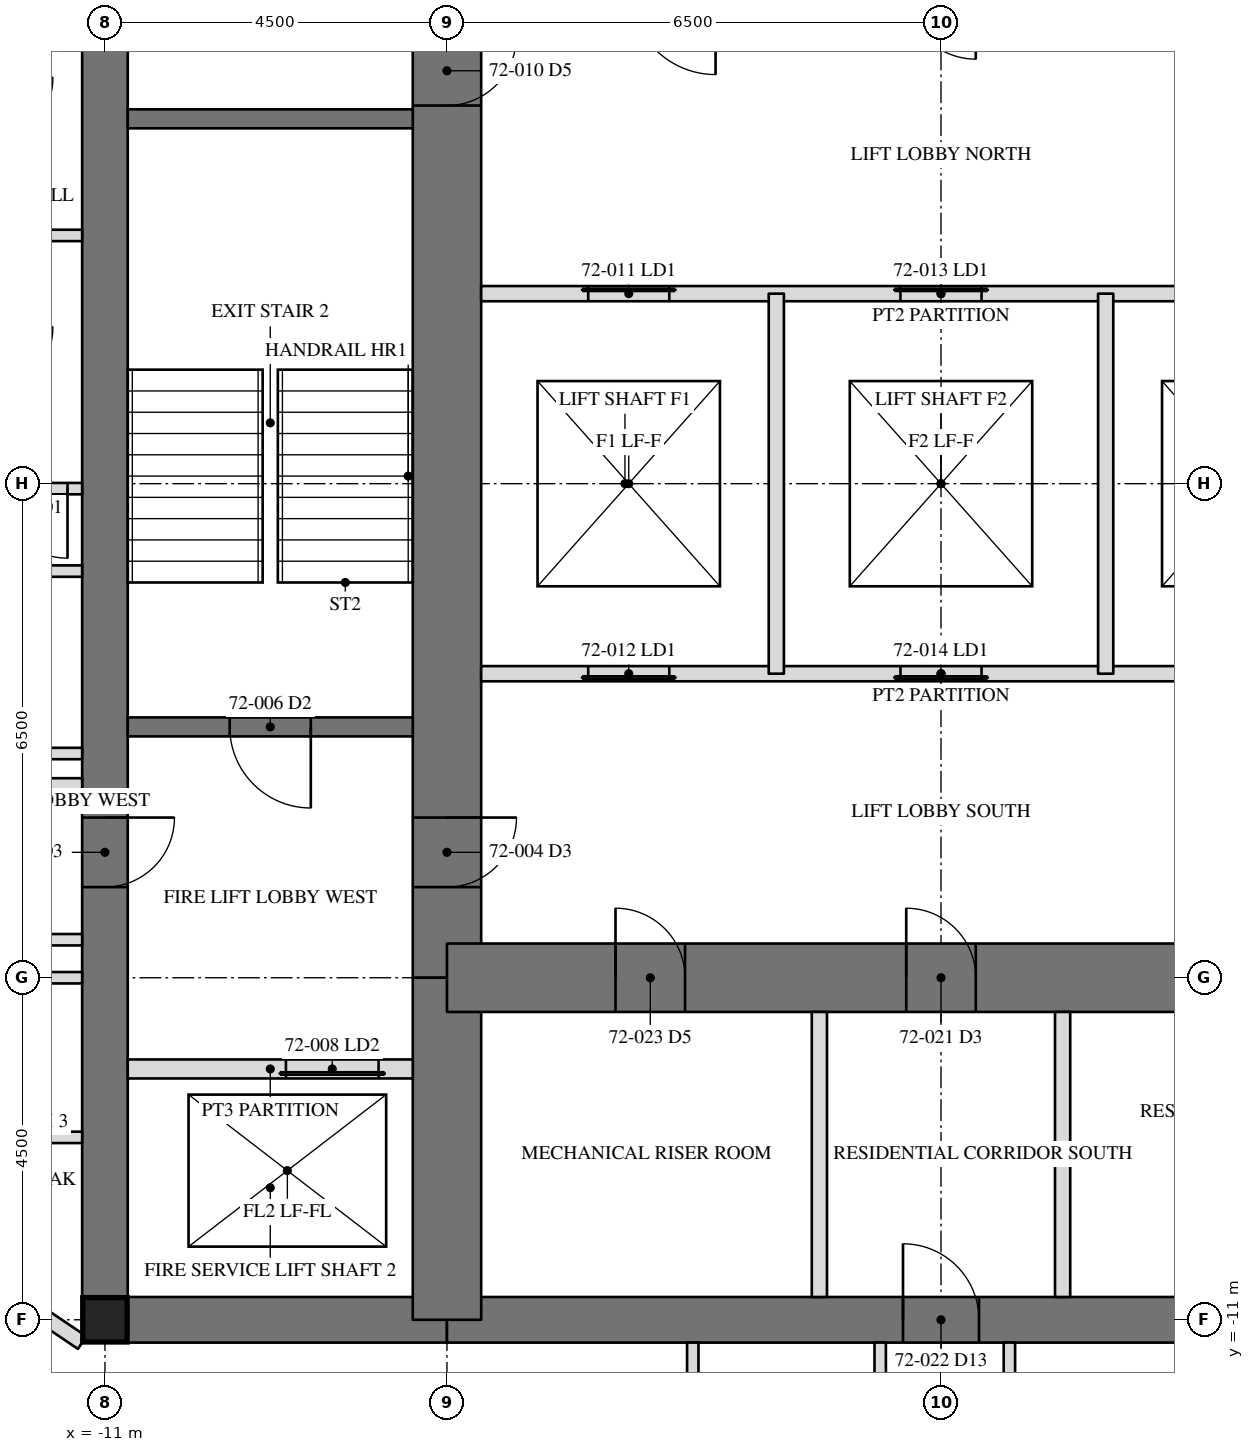
"""IFC4 building model, lengths in metres.
Left out: names, types, materials, properties, quantities, classifications, styles, units other than length and angle.
Written with IfcOpenShell. Run it as: python <this file> out.ifc"""

import sys

from ifc_helpers import new_model, si_unit, direction, frame, frame_2d, origin, origin_2d, place, context, subcontext, project, spatial, rectangle, hollow_rectangle, extrude, element, fill, save


model = new_model("IFC4")
c1 = context("Model", 3, precision=1e-05, world=origin(), true_north=direction((0.0, 1.0)))
c2 = subcontext(c1, "Body", "Model", "MODEL_VIEW")
j1 = project(units=[si_unit("LENGTHUNIT", "METRE"), si_unit("PLANEANGLEUNIT", "RADIAN")], contexts=[c1])
p1 = place(None, origin())
s1 = spatial("IfcSite", under=j1, at=p1, CompositionType="ELEMENT")
p2 = place(p1, origin())
s2 = spatial("IfcBuilding", under=s1, at=p2, CompositionType="ELEMENT")
p3 = place(p2, frame((0.0, 0.0, 292.0)))
s3 = spatial("IfcBuildingStorey", under=s2, at=p3, CompositionType="ELEMENT", Elevation=292.0)
p4 = place(p3, frame((-11.0, 11.0, 0.0), z_axis=(0.0, 0.0, 1.0), x_axis=(0.0, -1.0, 0.0)))
e1 = element("IfcWall", 1, at=p4, inside=s3, PredefinedType="SHEAR", context=c2, shape_type="SweptSolid", body=[
    extrude(rectangle(XDim=22.0, YDim=0.6, at=frame_2d((11.0, 0.0))), origin(), (0.0, 0.0, 1.0), 3.6),
])
p5 = place(p4, frame((15.393, 0.0, 0.0)))
e2 = element("IfcOpeningElement", 2, at=p5, cuts=e1, PredefinedType="OPENING", context=c2, shape_type="SweptSolid", body=[
    extrude(rectangle(XDim=0.915, YDim=2.134, at=frame_2d((0.458, 1.067))), frame((0.0, 0.31, 0.0), z_axis=(0.0, -1.0, 0.0), x_axis=(1.0, 0.0, 0.0)), (0.0, 0.0, 1.0), 0.62),
])
p6 = place(p3, frame((-11.0, -11.0, 0.0), z_axis=(0.0, 0.0, 1.0), x_axis=(1.0, 0.0, 0.0)))
e3 = element("IfcWall", 3, at=p6, inside=s3, PredefinedType="SHEAR", context=c2, shape_type="SweptSolid", body=[
    extrude(rectangle(XDim=4.5, YDim=0.6, at=frame_2d((2.25, 0.0))), origin(), (0.0, 0.0, 1.0), 3.6),
])
p7 = place(p3, frame((-6.5, -11.0, 0.0), z_axis=(0.0, 0.0, 1.0), x_axis=(1.0, 0.0, 0.0)))
e4 = element("IfcWall", 4, at=p7, inside=s3, PredefinedType="SHEAR", context=c2, shape_type="SweptSolid", body=[
    extrude(rectangle(XDim=13.0, YDim=0.6, at=frame_2d((6.5, 0.0))), origin(), (0.0, 0.0, 1.0), 3.6),
])
p8 = place(p7, frame((6.0, 0.0, 0.0)))
e5 = element("IfcOpeningElement", 5, at=p8, cuts=e4, PredefinedType="OPENING", context=c2, shape_type="SweptSolid", body=[
    extrude(rectangle(XDim=1.0, YDim=2.134, at=frame_2d((0.5, 1.067))), frame((0.0, 0.31, 0.0), z_axis=(0.0, -1.0, 0.0), x_axis=(1.0, 0.0, 0.0)), (0.0, 0.0, 1.0), 0.62),
])
p9 = place(p3, frame((-6.5, 6.5, 0.0), z_axis=(0.0, 0.0, 1.0), x_axis=(0.0, -1.0, 0.0)))
e6 = element("IfcWall", 6, at=p9, inside=s3, PredefinedType="SHEAR", context=c2, shape_type="SweptSolid", body=[
    extrude(rectangle(XDim=13.0, YDim=0.9, at=frame_2d((6.5, 0.0))), origin(), (0.0, 0.0, 1.0), 3.6),
])
p10 = place(p9, frame((10.893, 0.0, 0.0)))
e7 = element("IfcOpeningElement", 7, at=p10, cuts=e6, PredefinedType="OPENING", context=c2, shape_type="SweptSolid", body=[
    extrude(rectangle(XDim=0.915, YDim=2.134, at=frame_2d((0.458, 1.067))), frame((0.0, 0.46, 0.0), z_axis=(0.0, -1.0, 0.0), x_axis=(1.0, 0.0, 0.0)), (0.0, 0.0, 1.0), 0.92),
])
p11 = place(p9, frame((0.61, 0.0, 0.0)))
e8 = element("IfcOpeningElement", 8, at=p11, cuts=e6, PredefinedType="OPENING", context=c2, shape_type="SweptSolid", body=[
    extrude(rectangle(XDim=0.915, YDim=2.134, at=frame_2d((0.458, 1.067))), frame((0.0, 0.46, 0.0), z_axis=(0.0, -1.0, 0.0), x_axis=(1.0, 0.0, 0.0)), (0.0, 0.0, 1.0), 0.92),
])
p12 = place(p3, frame((-6.5, -6.5, 0.0), z_axis=(0.0, 0.0, 1.0), x_axis=(0.0, -1.0, 0.0)))
e9 = element("IfcWall", 9, at=p12, inside=s3, PredefinedType="SHEAR", context=c2, shape_type="SweptSolid", body=[
    extrude(rectangle(XDim=4.5, YDim=0.9, at=frame_2d((2.25, 0.0))), origin(), (0.0, 0.0, 1.0), 3.6),
])
p13 = place(p3, frame((-6.5, -6.5, 0.0), z_axis=(0.0, 0.0, 1.0), x_axis=(1.0, 0.0, 0.0)))
e10 = element("IfcWall", 10, at=p13, inside=s3, PredefinedType="SHEAR", context=c2, shape_type="SweptSolid", body=[
    extrude(rectangle(XDim=13.0, YDim=0.9, at=frame_2d((6.5, 0.0))), origin(), (0.0, 0.0, 1.0), 3.6),
])
p14 = place(p13, frame((6.042, 0.0, 0.0)))
e11 = element("IfcOpeningElement", 11, at=p14, cuts=e10, PredefinedType="OPENING", context=c2, shape_type="SweptSolid", body=[
    extrude(rectangle(XDim=0.915, YDim=2.134, at=frame_2d((0.458, 1.067))), frame((0.0, 0.46, 0.0), z_axis=(0.0, -1.0, 0.0), x_axis=(1.0, 0.0, 0.0)), (0.0, 0.0, 1.0), 0.92),
])
p15 = place(p13, frame((2.218, 0.0, 0.0)))
e12 = element("IfcOpeningElement", 12, at=p15, cuts=e10, PredefinedType="OPENING", context=c2, shape_type="SweptSolid", body=[
    extrude(rectangle(XDim=0.915, YDim=2.134, at=frame_2d((0.458, 1.067))), frame((0.0, 0.46, 0.0), z_axis=(0.0, -1.0, 0.0), x_axis=(1.0, 0.0, 0.0)), (0.0, 0.0, 1.0), 0.92),
])
p16 = place(p13, frame((9.867, 0.0, 0.0)))
e13 = element("IfcOpeningElement", 13, at=p16, cuts=e10, PredefinedType="OPENING", context=c2, shape_type="SweptSolid", body=[
    extrude(rectangle(XDim=0.915, YDim=2.134, at=frame_2d((0.458, 1.067))), frame((0.0, 0.46, 0.0), z_axis=(0.0, -1.0, 0.0), x_axis=(1.0, 0.0, 0.0)), (0.0, 0.0, 1.0), 0.92),
])
p17 = place(p3, frame((-11.0, -11.0, 0.0), z_axis=(0.0, 0.0, 1.0), x_axis=(1.0, 0.0, 0.0)))
e14 = element("IfcColumn", 14, at=p17, inside=s3, PredefinedType="COLUMN", context=c2, shape_type="SweptSolid", body=[
    extrude(hollow_rectangle(XDim=0.584, YDim=0.584, WallThickness=0.051, at=origin_2d()), origin(), (0.0, 0.0, 1.0), 3.6),
])
p18 = place(p3, frame((-6.95, 4.8, 0.0), z_axis=(0.0, 0.0, 1.0), x_axis=(-1.0, 0.0, 0.0)))
e15 = element("IfcWall", 15, at=p18, inside=s3, PredefinedType="SOLIDWALL", context=c2, shape_type="SweptSolid", body=[
    extrude(rectangle(XDim=3.75, YDim=0.25, at=frame_2d((1.875, 0.0))), origin(), (0.0, 0.0, 1.0), 3.41),
])
p19 = place(p3, frame((-6.95, -3.2, 0.0), z_axis=(0.0, 0.0, 1.0), x_axis=(-1.0, 0.0, 0.0)))
e16 = element("IfcWall", 16, at=p19, inside=s3, PredefinedType="SOLIDWALL", context=c2, shape_type="SweptSolid", body=[
    extrude(rectangle(XDim=3.75, YDim=0.25, at=frame_2d((1.875, 0.0))), origin(), (0.0, 0.0, 1.0), 3.41),
])
p20 = place(p19, frame((1.342, 0.0, 0.0)))
e17 = element("IfcOpeningElement", 17, at=p20, cuts=e16, PredefinedType="OPENING", context=c2, shape_type="SweptSolid", body=[
    extrude(rectangle(XDim=1.067, YDim=2.134, at=frame_2d((0.533, 1.067))), frame((0.0, 0.135, 0.0), z_axis=(0.0, -1.0, 0.0), x_axis=(1.0, 0.0, 0.0)), (0.0, 0.0, 1.0), 0.27),
])
p21 = place(p3, frame((-6.95, -7.7, 0.0), z_axis=(0.0, 0.0, 1.0), x_axis=(-1.0, 0.0, 0.0)))
e18 = element("IfcWall", 18, at=p21, inside=s3, PredefinedType="PARTITIONING", context=c2, shape_type="SweptSolid", body=[
    extrude(rectangle(XDim=3.75, YDim=0.25, at=frame_2d((1.875, 0.0))), origin(), (0.0, 0.0, 1.0), 3.41),
])
p22 = place(p21, frame((0.45, 0.0, 0.0)))
e19 = element("IfcOpeningElement", 19, at=p22, cuts=e18, PredefinedType="OPENING", context=c2, shape_type="SweptSolid", body=[
    extrude(rectangle(XDim=1.219, YDim=2.134, at=frame_2d((0.609, 1.067))), frame((0.0, 0.135, 0.0), z_axis=(0.0, -1.0, 0.0), x_axis=(1.0, 0.0, 0.0)), (0.0, 0.0, 1.0), 0.27),
])
p23 = place(p3, frame((-6.05, 2.5, 0.0), z_axis=(0.0, 0.0, 1.0), x_axis=(1.0, 0.0, 0.0)))
e20 = element("IfcWall", 20, at=p23, inside=s3, PredefinedType="PARTITIONING", context=c2, shape_type="SweptSolid", body=[
    extrude(rectangle(XDim=12.1, YDim=0.2, at=frame_2d((6.05, 0.0))), origin(), (0.0, 0.0, 1.0), 3.41),
])
p24 = place(p23, frame((1.408, 0.0, 0.0)))
e21 = element("IfcOpeningElement", 21, at=p24, cuts=e20, PredefinedType="OPENING", context=c2, shape_type="SweptSolid", body=[
    extrude(rectangle(XDim=1.067, YDim=2.134, at=frame_2d((0.533, 1.067))), frame((0.0, 0.11, 0.0), z_axis=(0.0, -1.0, 0.0), x_axis=(1.0, 0.0, 0.0)), (0.0, 0.0, 1.0), 0.22),
])
p25 = place(p23, frame((5.517, 0.0, 0.0)))
e22 = element("IfcOpeningElement", 22, at=p25, cuts=e20, PredefinedType="OPENING", context=c2, shape_type="SweptSolid", body=[
    extrude(rectangle(XDim=1.067, YDim=2.134, at=frame_2d((0.533, 1.067))), frame((0.0, 0.11, 0.0), z_axis=(0.0, -1.0, 0.0), x_axis=(1.0, 0.0, 0.0)), (0.0, 0.0, 1.0), 0.22),
])
p26 = place(p23, frame((9.625, 0.0, 0.0)))
e23 = element("IfcOpeningElement", 23, at=p26, cuts=e20, PredefinedType="OPENING", context=c2, shape_type="SweptSolid", body=[
    extrude(rectangle(XDim=1.067, YDim=2.134, at=frame_2d((0.533, 1.067))), frame((0.0, 0.11, 0.0), z_axis=(0.0, -1.0, 0.0), x_axis=(1.0, 0.0, 0.0)), (0.0, 0.0, 1.0), 0.22),
])
p27 = place(p3, frame((6.05, -2.5, 0.0), z_axis=(0.0, 0.0, 1.0), x_axis=(-1.0, 0.0, 0.0)))
e24 = element("IfcWall", 24, at=p27, inside=s3, PredefinedType="PARTITIONING", context=c2, shape_type="SweptSolid", body=[
    extrude(rectangle(XDim=12.1, YDim=0.2, at=frame_2d((6.05, 0.0))), origin(), (0.0, 0.0, 1.0), 3.41),
])
p28 = place(p27, frame((9.625, 0.0, 0.0)))
e25 = element("IfcOpeningElement", 25, at=p28, cuts=e24, PredefinedType="OPENING", context=c2, shape_type="SweptSolid", body=[
    extrude(rectangle(XDim=1.067, YDim=2.134, at=frame_2d((0.533, 1.067))), frame((0.0, 0.11, 0.0), z_axis=(0.0, -1.0, 0.0), x_axis=(1.0, 0.0, 0.0)), (0.0, 0.0, 1.0), 0.22),
])
p29 = place(p27, frame((5.517, 0.0, 0.0)))
e26 = element("IfcOpeningElement", 26, at=p29, cuts=e24, PredefinedType="OPENING", context=c2, shape_type="SweptSolid", body=[
    extrude(rectangle(XDim=1.067, YDim=2.134, at=frame_2d((0.533, 1.067))), frame((0.0, 0.11, 0.0), z_axis=(0.0, -1.0, 0.0), x_axis=(1.0, 0.0, 0.0)), (0.0, 0.0, 1.0), 0.22),
])
p30 = place(p27, frame((1.408, 0.0, 0.0)))
e27 = element("IfcOpeningElement", 27, at=p30, cuts=e24, PredefinedType="OPENING", context=c2, shape_type="SweptSolid", body=[
    extrude(rectangle(XDim=1.067, YDim=2.134, at=frame_2d((0.533, 1.067))), frame((0.0, 0.11, 0.0), z_axis=(0.0, -1.0, 0.0), x_axis=(1.0, 0.0, 0.0)), (0.0, 0.0, 1.0), 0.22),
])
for number, where, z_axis, x_axis in (
    (28, (-2.167, -2.5, 0.0), (0.0, 0.0, 1.0), (0.0, 1.0, 0.0)),
    (29, (2.167, -2.5, 0.0), (0.0, 0.0, 1.0), (0.0, 1.0, 0.0)),
):
    element("IfcWall", number, at=place(p3, frame(where, z_axis=z_axis, x_axis=x_axis)), inside=s3, PredefinedType="PARTITIONING", context=c2, shape_type="SweptSolid", body=[
        extrude(rectangle(XDim=5.0, YDim=0.2, at=frame_2d((2.5, 0.0))), origin(), (0.0, 0.0, 1.0), 3.41),
    ])
for number, where, z_axis, x_axis in (
    (30, (-1.6, -6.95, 0.0), (0.0, 0.0, 1.0), (0.0, -1.0, 0.0)),
    (31, (1.6, -6.95, 0.0), (0.0, 0.0, 1.0), (0.0, -1.0, 0.0)),
):
    element("IfcWall", number, at=place(p3, frame(where, z_axis=z_axis, x_axis=x_axis)), inside=s3, PredefinedType="PARTITIONING", context=c2, shape_type="SweptSolid", body=[
        extrude(rectangle(XDim=3.75, YDim=0.2, at=frame_2d((1.875, 0.0))), origin(), (0.0, 0.0, 1.0), 3.41),
    ])
p31 = place(p3, frame((-11.3, -11.3, 0.0), z_axis=(0.0, 0.0, 1.0), x_axis=(-0.829279340477, 0.558834300538, 0.0)))
e32 = element("IfcWall", 32, at=p31, inside=s3, PredefinedType="PARTITIONING", context=c2, shape_type="SweptSolid", body=[
    extrude(rectangle(XDim=3.048, YDim=0.2, at=frame_2d((1.524, 0.0))), origin(), (0.0, 0.0, 1.0), 2.704),
])
p32 = place(p3, frame((-11.3, 3.266, 0.0), z_axis=(0.0, 0.0, 1.0), x_axis=(-1.0, 0.0, 0.0)))
e33 = element("IfcWall", 33, at=p32, inside=s3, PredefinedType="PARTITIONING", context=c2, shape_type="SweptSolid", body=[
    extrude(rectangle(XDim=5.615, YDim=0.15, at=frame_2d((2.808, 0.0))), origin(), (0.0, 0.0, 1.0), 2.709),
])
p33 = place(p3, frame((-11.3, -0.065, 0.0), z_axis=(0.0, 0.0, 1.0), x_axis=(-1.0, 0.0, 0.0)))
e34 = element("IfcWall", 34, at=p33, inside=s3, PredefinedType="PARTITIONING", context=c2, shape_type="SweptSolid", body=[
    extrude(rectangle(XDim=5.615, YDim=0.15, at=frame_2d((2.808, 0.0))), origin(), (0.0, 0.0, 1.0), 2.709),
])
p34 = place(p33, frame((0.192, 0.0, 0.0)))
e35 = element("IfcOpeningElement", 35, at=p34, cuts=e34, PredefinedType="OPENING", context=c2, shape_type="SweptSolid", body=[
    extrude(rectangle(XDim=0.915, YDim=2.134, at=frame_2d((0.458, 1.067))), frame((0.0, 0.085, 0.0), z_axis=(0.0, -1.0, 0.0), x_axis=(1.0, 0.0, 0.0)), (0.0, 0.0, 1.0), 0.17),
])
p35 = place(p3, frame((-11.3, -6.5, 0.0), z_axis=(0.0, 0.0, 1.0), x_axis=(-1.0, 0.0, 0.0)))
e36 = element("IfcWall", 36, at=p35, inside=s3, PredefinedType="PARTITIONING", context=c2, shape_type="SweptSolid", body=[
    extrude(rectangle(XDim=5.615, YDim=0.15, at=frame_2d((2.808, 0.0))), origin(), (0.0, 0.0, 1.0), 2.966),
])
p36 = place(p35, frame((2.742, 0.0, 0.0)))
e37 = element("IfcOpeningElement", 37, at=p36, cuts=e36, PredefinedType="OPENING", context=c2, shape_type="SweptSolid", body=[
    extrude(rectangle(XDim=0.915, YDim=2.134, at=frame_2d((0.458, 1.067))), frame((0.0, 0.085, 0.0), z_axis=(0.0, -1.0, 0.0), x_axis=(1.0, 0.0, 0.0)), (0.0, 0.0, 1.0), 0.17),
])
for number, where, z_axis, x_axis in (
    (38, (-11.3, -3.95, 0.0), (0.0, 0.0, 1.0), (-1.0, 0.0, 0.0)),
    (39, (-11.3, -6.0, 0.0), (0.0, 0.0, 1.0), (-1.0, 0.0, 0.0)),
):
    element("IfcWall", number, at=place(p3, frame(where, z_axis=z_axis, x_axis=x_axis)), inside=s3, PredefinedType="PARTITIONING", context=c2, shape_type="SweptSolid", body=[
        extrude(rectangle(XDim=1.525, YDim=0.15, at=frame_2d((0.762, 0.0))), origin(), (0.0, 0.0, 1.0), 3.41),
    ])
for number, where, z_axis, x_axis in (
    (40, (-11.3, -1.15, 0.0), (0.0, 0.0, 1.0), (-1.0, 0.0, 0.0)),
    (41, (-11.3, -3.55, 0.0), (0.0, 0.0, 1.0), (-1.0, 0.0, 0.0)),
):
    element("IfcWall", number, at=place(p3, frame(where, z_axis=z_axis, x_axis=x_axis)), inside=s3, PredefinedType="PARTITIONING", context=c2, shape_type="SweptSolid", body=[
        extrude(rectangle(XDim=2.725, YDim=0.15, at=frame_2d((1.362, 0.0))), origin(), (0.0, 0.0, 1.0), 3.41),
    ])
p37 = place(p3, frame((-11.3, -8.6, 0.0), z_axis=(0.0, 0.0, 1.0), x_axis=(-1.0, 0.0, 0.0)))
e42 = element("IfcWall", 42, at=p37, inside=s3, PredefinedType="PARTITIONING", context=c2, shape_type="SweptSolid", body=[
    extrude(rectangle(XDim=1.925, YDim=0.15, at=frame_2d((0.962, 0.0))), origin(), (0.0, 0.0, 1.0), 3.41),
])
p38 = place(p3, frame((-3.266, -11.3, 0.0), z_axis=(0.0, 0.0, 1.0), x_axis=(0.0, -1.0, 0.0)))
e43 = element("IfcWall", 43, at=p38, inside=s3, PredefinedType="PARTITIONING", context=c2, shape_type="SweptSolid", body=[
    extrude(rectangle(XDim=5.615, YDim=0.15, at=frame_2d((2.808, 0.0))), origin(), (0.0, 0.0, 1.0), 2.709),
])
p39 = place(p38, frame((3.242, 0.0, 0.0)))
e44 = element("IfcOpeningElement", 44, at=p39, cuts=e43, PredefinedType="OPENING", context=c2, shape_type="SweptSolid", body=[
    extrude(rectangle(XDim=0.915, YDim=2.134, at=frame_2d((0.458, 1.067))), frame((0.0, 0.085, 0.0), z_axis=(0.0, -1.0, 0.0), x_axis=(1.0, 0.0, 0.0)), (0.0, 0.0, 1.0), 0.17),
])
p40 = place(p3, frame((0.9, -11.3, 0.0), z_axis=(0.0, 0.0, 1.0), x_axis=(0.0, -1.0, 0.0)))
e45 = element("IfcWall", 45, at=p40, inside=s3, PredefinedType="PARTITIONING", context=c2, shape_type="SweptSolid", body=[
    extrude(rectangle(XDim=2.725, YDim=0.15, at=frame_2d((1.362, 0.0))), origin(), (0.0, 0.0, 1.0), 3.41),
])
p41 = place(p3, frame((-0.8, -11.3, 0.0), z_axis=(0.0, 0.0, 1.0), x_axis=(0.0, -1.0, 0.0)))
e46 = element("IfcWall", 46, at=p41, inside=s3, PredefinedType="PARTITIONING", context=c2, shape_type="SweptSolid", body=[
    extrude(rectangle(XDim=2.375, YDim=0.15, at=frame_2d((1.188, 0.0))), origin(), (0.0, 0.0, 1.0), 3.41),
])
p42 = place(p5, origin())
e47 = element("IfcDoor", 47, at=p42, inside=s3, OperationType="SINGLE_SWING_RIGHT", PredefinedType="DOOR", context=c2, shape_type="SweptSolid", body=[
    extrude(rectangle(XDim=0.915, YDim=2.134, at=frame_2d((0.458, 1.067))), frame((0.0, -0.225, 0.0), z_axis=(0.0, -1.0, 0.0), x_axis=(1.0, 0.0, 0.0)), (0.0, 0.0, 1.0), 0.05),
])
fill(e2, e47)
p43 = place(p10, origin())
e48 = element("IfcDoor", 48, at=p43, inside=s3, OperationType="SINGLE_SWING_RIGHT", PredefinedType="DOOR", context=c2, shape_type="SweptSolid", body=[
    extrude(rectangle(XDim=0.915, YDim=2.134, at=frame_2d((0.458, 1.067))), frame((0.0, -0.375, 0.0), z_axis=(0.0, -1.0, 0.0), x_axis=(1.0, 0.0, 0.0)), (0.0, 0.0, 1.0), 0.05),
])
fill(e7, e48)
p44 = place(p20, origin())
e49 = element("IfcDoor", 49, at=p44, inside=s3, OperationType="SINGLE_SWING_LEFT", PredefinedType="DOOR", context=c2, shape_type="SweptSolid", body=[
    extrude(rectangle(XDim=1.067, YDim=2.134, at=frame_2d((0.533, 1.067))), frame((0.0, 0.025, 0.0), z_axis=(0.0, -1.0, 0.0), x_axis=(1.0, 0.0, 0.0)), (0.0, 0.0, 1.0), 0.05),
])
fill(e17, e49)
p45 = place(p22, origin())
e50 = element("IfcDoor", 50, at=p45, inside=s3, OperationType="SLIDING_TO_LEFT", PredefinedType="DOOR", context=c2, shape_type="SweptSolid", body=[
    extrude(rectangle(XDim=1.219, YDim=2.134, at=frame_2d((0.609, 1.067))), frame((0.0, 0.025, 0.0), z_axis=(0.0, -1.0, 0.0), x_axis=(1.0, 0.0, 0.0)), (0.0, 0.0, 1.0), 0.05),
])
fill(e19, e50)
p46 = place(p11, origin())
e51 = element("IfcDoor", 51, at=p46, inside=s3, OperationType="SINGLE_SWING_RIGHT", PredefinedType="DOOR", context=c2, shape_type="SweptSolid", body=[
    extrude(rectangle(XDim=0.915, YDim=2.134, at=frame_2d((0.458, 1.067))), frame((0.0, -0.375, 0.0), z_axis=(0.0, -1.0, 0.0), x_axis=(1.0, 0.0, 0.0)), (0.0, 0.0, 1.0), 0.05),
])
fill(e8, e51)
p47 = place(p24, origin())
e52 = element("IfcDoor", 52, at=p47, inside=s3, OperationType="SLIDING_TO_LEFT", PredefinedType="DOOR", context=c2, shape_type="SweptSolid", body=[
    extrude(rectangle(XDim=1.067, YDim=2.134, at=frame_2d((0.533, 1.067))), frame((0.0, 0.025, 0.0), z_axis=(0.0, -1.0, 0.0), x_axis=(1.0, 0.0, 0.0)), (0.0, 0.0, 1.0), 0.05),
])
fill(e21, e52)
p48 = place(p28, origin())
e53 = element("IfcDoor", 53, at=p48, inside=s3, OperationType="SLIDING_TO_LEFT", PredefinedType="DOOR", context=c2, shape_type="SweptSolid", body=[
    extrude(rectangle(XDim=1.067, YDim=2.134, at=frame_2d((0.533, 1.067))), frame((0.0, 0.025, 0.0), z_axis=(0.0, -1.0, 0.0), x_axis=(1.0, 0.0, 0.0)), (0.0, 0.0, 1.0), 0.05),
])
fill(e25, e53)
p49 = place(p25, origin())
e54 = element("IfcDoor", 54, at=p49, inside=s3, OperationType="SLIDING_TO_LEFT", PredefinedType="DOOR", context=c2, shape_type="SweptSolid", body=[
    extrude(rectangle(XDim=1.067, YDim=2.134, at=frame_2d((0.533, 1.067))), frame((0.0, 0.025, 0.0), z_axis=(0.0, -1.0, 0.0), x_axis=(1.0, 0.0, 0.0)), (0.0, 0.0, 1.0), 0.05),
])
fill(e22, e54)
p50 = place(p29, origin())
e55 = element("IfcDoor", 55, at=p50, inside=s3, OperationType="SLIDING_TO_LEFT", PredefinedType="DOOR", context=c2, shape_type="SweptSolid", body=[
    extrude(rectangle(XDim=1.067, YDim=2.134, at=frame_2d((0.533, 1.067))), frame((0.0, 0.025, 0.0), z_axis=(0.0, -1.0, 0.0), x_axis=(1.0, 0.0, 0.0)), (0.0, 0.0, 1.0), 0.05),
])
fill(e26, e55)
p51 = place(p14, origin())
e56 = element("IfcDoor", 56, at=p51, inside=s3, OperationType="SINGLE_SWING_RIGHT", PredefinedType="DOOR", context=c2, shape_type="SweptSolid", body=[
    extrude(rectangle(XDim=0.915, YDim=2.134, at=frame_2d((0.458, 1.067))), frame((0.0, -0.375, 0.0), z_axis=(0.0, -1.0, 0.0), x_axis=(1.0, 0.0, 0.0)), (0.0, 0.0, 1.0), 0.05),
])
fill(e11, e56)
p52 = place(p8, origin())
e57 = element("IfcDoor", 57, at=p52, inside=s3, OperationType="SINGLE_SWING_RIGHT", PredefinedType="DOOR", context=c2, shape_type="SweptSolid", body=[
    extrude(rectangle(XDim=1.0, YDim=2.134, at=frame_2d((0.5, 1.067))), frame((0.0, -0.225, 0.0), z_axis=(0.0, -1.0, 0.0), x_axis=(1.0, 0.0, 0.0)), (0.0, 0.0, 1.0), 0.05),
])
fill(e5, e57)
p53 = place(p15, origin())
e58 = element("IfcDoor", 58, at=p53, inside=s3, OperationType="SINGLE_SWING_RIGHT", PredefinedType="DOOR", context=c2, shape_type="SweptSolid", body=[
    extrude(rectangle(XDim=0.915, YDim=2.134, at=frame_2d((0.458, 1.067))), frame((0.0, -0.375, 0.0), z_axis=(0.0, -1.0, 0.0), x_axis=(1.0, 0.0, 0.0)), (0.0, 0.0, 1.0), 0.05),
])
fill(e12, e58)
p54 = place(p34, origin())
e59 = element("IfcDoor", 59, at=p54, inside=s3, OperationType="SINGLE_SWING_LEFT", PredefinedType="DOOR", context=c2, shape_type="SweptSolid", body=[
    extrude(rectangle(XDim=0.915, YDim=2.134, at=frame_2d((0.458, 1.067))), frame((0.0, 0.025, 0.0), z_axis=(0.0, -1.0, 0.0), x_axis=(1.0, 0.0, 0.0)), (0.0, 0.0, 1.0), 0.05),
])
fill(e35, e59)
save(model, sys.argv[1])
